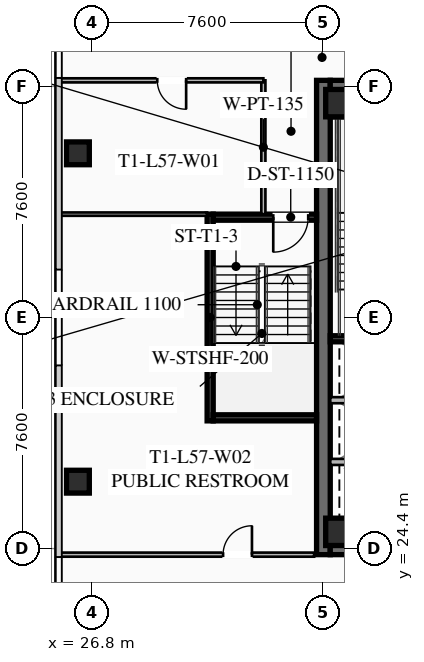
"""IFC4 building model, lengths in metres.
Left out: names, types, materials, properties, quantities, classifications, styles, units other than length and angle.
Written with IfcOpenShell. Run it as: python <this file> out.ifc"""

import sys

from ifc_helpers import new_model, si_unit, direction, frame, frame_2d, origin, origin_2d, place, context, subcontext, project, spatial, rectangle, hollow_rectangle, extrude, element, fill, save


model = new_model("IFC4")
c1 = context("Model", 3, precision=1e-05, world=origin(), true_north=direction((0.0, 1.0)))
c2 = subcontext(c1, "Body", "Model", "MODEL_VIEW")
j1 = project(units=[si_unit("LENGTHUNIT", "METRE"), si_unit("PLANEANGLEUNIT", "RADIAN")], contexts=[c1])
p1 = place(None, origin())
s1 = spatial("IfcSite", under=j1, at=p1, CompositionType="ELEMENT")
p2 = place(p1, origin())
s2 = spatial("IfcBuilding", under=s1, at=p2, CompositionType="ELEMENT")
p3 = place(p2, frame((0.0, 0.0, 211.3)))
s3 = spatial("IfcBuildingStorey", under=s2, at=p3, CompositionType="ELEMENT", Elevation=211.3)
p4 = place(p3, frame((34.425, 24.2, 0.0), z_axis=(0.0, 0.0, 1.0), x_axis=(0.0, 1.0, 0.0)))
e1 = element("IfcWall", 1, at=p4, inside=s3, PredefinedType="SHEAR", context=c2, shape_type="SweptSolid", body=[
    extrude(rectangle(XDim=15.6, YDim=0.45, at=frame_2d((7.8, 0.0))), origin(), (0.0, 0.0, 1.0), 3.55),
])
p5 = place(p3, frame((49.35, 24.425, 0.0), z_axis=(0.0, 0.0, 1.0), x_axis=(-1.0, 0.0, 0.0)))
e2 = element("IfcWall", 2, at=p5, inside=s3, PredefinedType="SHEAR", context=c2, shape_type="SweptSolid", body=[
    extrude(rectangle(XDim=14.7, YDim=0.45, at=frame_2d((7.35, 0.0))), origin(), (0.0, 0.0, 1.0), 3.55),
])
p6 = place(p5, frame((9.05, 0.0, 0.0)))
e3 = element("IfcOpeningElement", 3, at=p6, cuts=e2, PredefinedType="OPENING", context=c2, shape_type="SweptSolid", body=[
    extrude(rectangle(XDim=1.25, YDim=2.25, at=frame_2d((0.625, 1.125))), frame((0.0, 0.235, 0.0), z_axis=(0.0, -1.0, 0.0), x_axis=(1.0, 0.0, 0.0)), (0.0, 0.0, 1.0), 0.47),
])
p7 = place(p5, frame((4.0, 0.0, 0.0)))
e4 = element("IfcOpeningElement", 4, at=p7, cuts=e2, PredefinedType="OPENING", context=c2, shape_type="SweptSolid", body=[
    extrude(rectangle(XDim=1.25, YDim=2.25, at=frame_2d((0.625, 1.125))), frame((0.0, 0.235, 0.0), z_axis=(0.0, -1.0, 0.0), x_axis=(1.0, 0.0, 0.0)), (0.0, 0.0, 1.0), 0.47),
])
p8 = place(p3, frame((34.65, 39.575, 0.0), z_axis=(0.0, 0.0, 1.0), x_axis=(1.0, 0.0, 0.0)))
e5 = element("IfcWall", 5, at=p8, inside=s3, PredefinedType="SHEAR", context=c2, shape_type="SweptSolid", body=[
    extrude(rectangle(XDim=14.7, YDim=0.45, at=frame_2d((7.35, 0.0))), origin(), (0.0, 0.0, 1.0), 3.55),
])
p9 = place(p8, frame((4.4, 0.0, 0.0)))
e6 = element("IfcOpeningElement", 6, at=p9, cuts=e5, PredefinedType="OPENING", context=c2, shape_type="SweptSolid", body=[
    extrude(rectangle(XDim=1.25, YDim=2.25, at=frame_2d((0.625, 1.125))), frame((0.0, 0.235, 0.0), z_axis=(0.0, -1.0, 0.0), x_axis=(1.0, 0.0, 0.0)), (0.0, 0.0, 1.0), 0.47),
])
p10 = place(p8, frame((9.45, 0.0, 0.0)))
e7 = element("IfcOpeningElement", 7, at=p10, cuts=e5, PredefinedType="OPENING", context=c2, shape_type="SweptSolid", body=[
    extrude(rectangle(XDim=1.25, YDim=2.25, at=frame_2d((0.625, 1.125))), frame((0.0, 0.235, 0.0), z_axis=(0.0, -1.0, 0.0), x_axis=(1.0, 0.0, 0.0)), (0.0, 0.0, 1.0), 0.47),
])
for number, where, z_axis, x_axis in (
    (8, (34.95, 24.95, 0.0), (0.0, 0.0, 1.0), (1.0, 0.0, 0.0)),
    (9, (34.95, 39.05, 0.0), (0.0, 0.0, 1.0), (1.0, 0.0, 0.0)),
):
    element("IfcColumn", number, at=place(p3, frame(where, z_axis=z_axis, x_axis=x_axis)), inside=s3, PredefinedType="COLUMN", context=c2, shape_type="SweptSolid", body=[
        extrude(hollow_rectangle(XDim=0.9, YDim=0.9, WallThickness=0.04, at=origin_2d()), origin(), (0.0, 0.0, 1.0), 3.37),
    ])
for number, where, z_axis, x_axis in (
    (10, (26.35, 37.4, 0.0), (0.0, 0.0, 1.0), (1.0, 0.0, 0.0)),
    (11, (26.35, 26.6, 0.0), (0.0, 0.0, 1.0), (1.0, 0.0, 0.0)),
):
    element("IfcColumn", number, at=place(p3, frame(where, z_axis=z_axis, x_axis=x_axis)), inside=s3, PredefinedType="COLUMN", context=c2, shape_type="SweptSolid", body=[
        extrude(hollow_rectangle(XDim=0.75, YDim=0.75, WallThickness=0.032, at=origin_2d()), origin(), (0.0, 0.0, 1.0), 3.37),
    ])
for number, where, z_axis, x_axis in (
    (12, (34.65, 31.3, 0.0), (0.0, 0.0, 1.0), (1.0, 0.0, 0.0)),
    (13, (34.65, 38.7, 0.0), (0.0, 0.0, 1.0), (1.0, 0.0, 0.0)),
):
    element("IfcWall", number, at=place(p3, frame(where, z_axis=z_axis, x_axis=x_axis)), inside=s3, PredefinedType="SHEAR", context=c2, shape_type="SweptSolid", body=[
        extrude(rectangle(XDim=3.65, YDim=0.2, at=frame_2d((1.825, 0.0))), origin(), (0.0, 0.0, 1.0), 3.37),
    ])
for number, where, z_axis, x_axis in (
    (14, (34.65, 27.25, 0.0), (0.0, 0.0, 1.0), (1.0, 0.0, 0.0)),
    (15, (34.65, 29.28, 0.0), (0.0, 0.0, 1.0), (1.0, 0.0, 0.0)),
):
    element("IfcWall", number, at=place(p3, frame(where, z_axis=z_axis, x_axis=x_axis)), inside=s3, PredefinedType="SOLIDWALL", context=c2, shape_type="SweptSolid", body=[
        extrude(rectangle(XDim=3.3, YDim=0.2, at=frame_2d((1.65, 0.0))), origin(), (0.0, 0.0, 1.0), 3.37),
    ])
p11 = place(p3, frame((30.7, 28.6, 0.0), z_axis=(0.0, 0.0, 1.0), x_axis=(0.0, 1.0, 0.0)))
e16 = element("IfcWall", 16, at=p11, inside=s3, PredefinedType="SHEAR", context=c2, shape_type="SweptSolid", body=[
    extrude(rectangle(XDim=6.8, YDim=0.2, at=frame_2d((3.4, 0.0))), origin(), (0.0, 0.0, 1.0), 3.37),
])
p12 = place(p3, frame((34.2, 35.3, 0.0), z_axis=(0.0, 0.0, 1.0), x_axis=(-1.0, 0.0, 0.0)))
e17 = element("IfcWall", 17, at=p12, inside=s3, PredefinedType="SHEAR", context=c2, shape_type="SweptSolid", body=[
    extrude(rectangle(XDim=3.4, YDim=0.2, at=frame_2d((1.7, 0.0))), origin(), (0.0, 0.0, 1.0), 3.37),
])
p13 = place(p12, frame((0.275, 0.0, 0.0)))
e18 = element("IfcOpeningElement", 18, at=p13, cuts=e17, PredefinedType="OPENING", context=c2, shape_type="SweptSolid", body=[
    extrude(rectangle(XDim=1.15, YDim=2.2, at=frame_2d((0.575, 1.1))), frame((0.0, 0.11, 0.0), z_axis=(0.0, -1.0, 0.0), x_axis=(1.0, 0.0, 0.0)), (0.0, 0.0, 1.0), 0.22),
])
p14 = place(p3, frame((30.8, 28.7, 0.0), z_axis=(0.0, 0.0, 1.0), x_axis=(1.0, 0.0, 0.0)))
e19 = element("IfcWall", 19, at=p14, inside=s3, PredefinedType="SHEAR", context=c2, shape_type="SweptSolid", body=[
    extrude(rectangle(XDim=3.4, YDim=0.2, at=frame_2d((1.7, 0.0))), origin(), (0.0, 0.0, 1.0), 3.37),
])
p15 = place(p3, frame((32.45, 35.4, 0.0), z_axis=(0.0, 0.0, 1.0), x_axis=(0.0, 1.0, 0.0)))
e20 = element("IfcWall", 20, at=p15, inside=s3, PredefinedType="PARTITIONING", context=c2, shape_type="SweptSolid", body=[
    extrude(rectangle(XDim=4.4, YDim=0.135, at=frame_2d((2.2, 0.0))), origin(), (0.0, 0.0, 1.0), 2.723),
])
p16 = place(p3, frame((32.45, 39.8, 0.0), z_axis=(0.0, 0.0, 1.0), x_axis=(-1.0, 0.0, 0.0)))
e21 = element("IfcWall", 21, at=p16, inside=s3, PredefinedType="PARTITIONING", context=c2, shape_type="SweptSolid", body=[
    extrude(rectangle(XDim=6.73, YDim=0.135, at=frame_2d((3.365, 0.0))), origin(), (0.0, 0.0, 1.0), 2.723),
])
p17 = place(p16, frame((2.54, 0.0, 0.0)))
e22 = element("IfcOpeningElement", 22, at=p17, cuts=e21, PredefinedType="OPENING", context=c2, shape_type="SweptSolid", body=[
    extrude(rectangle(XDim=0.95, YDim=2.05, at=frame_2d((0.475, 1.025))), frame((0.0, 0.077, 0.0), z_axis=(0.0, -1.0, 0.0), x_axis=(1.0, 0.0, 0.0)), (0.0, 0.0, 1.0), 0.155),
])
p18 = place(p3, frame((25.72, 24.2, 0.0), z_axis=(0.0, 0.0, 1.0), x_axis=(1.0, 0.0, 0.0)))
e23 = element("IfcWall", 23, at=p18, inside=s3, PredefinedType="PARTITIONING", context=c2, shape_type="SweptSolid", body=[
    extrude(rectangle(XDim=8.4, YDim=0.135, at=frame_2d((4.2, 0.0))), origin(), (0.0, 0.0, 1.0), 2.723),
])
p19 = place(p18, frame((5.405, 0.0, 0.0)))
e24 = element("IfcOpeningElement", 24, at=p19, cuts=e23, PredefinedType="OPENING", context=c2, shape_type="SweptSolid", body=[
    extrude(rectangle(XDim=0.95, YDim=2.05, at=frame_2d((0.475, 1.025))), frame((0.0, 0.077, 0.0), z_axis=(0.0, -1.0, 0.0), x_axis=(1.0, 0.0, 0.0)), (0.0, 0.0, 1.0), 0.155),
])
p20 = place(p3, frame((30.6, 35.4, 0.0), z_axis=(0.0, 0.0, 1.0), x_axis=(-1.0, 0.0, 0.0)))
e25 = element("IfcWall", 25, at=p20, inside=s3, PredefinedType="PARTITIONING", context=c2, shape_type="SweptSolid", body=[
    extrude(rectangle(XDim=4.88, YDim=0.11, at=frame_2d((2.44, 0.0))), origin(), (0.0, 0.0, 1.0), 2.723),
])
p21 = place(p13, origin())
e26 = element("IfcDoor", 26, at=p21, inside=s3, OperationType="SINGLE_SWING_RIGHT", PredefinedType="DOOR", context=c2, shape_type="SweptSolid", body=[
    extrude(rectangle(XDim=1.15, YDim=2.2, at=frame_2d((0.575, 1.1))), frame((0.0, 0.025, 0.0), z_axis=(0.0, -1.0, 0.0), x_axis=(1.0, 0.0, 0.0)), (0.0, 0.0, 1.0), 0.05),
])
fill(e18, e26)
p22 = place(p17, origin())
e27 = element("IfcDoor", 27, at=p22, inside=s3, OperationType="SINGLE_SWING_LEFT", PredefinedType="DOOR", context=c2, shape_type="SweptSolid", body=[
    extrude(rectangle(XDim=0.95, YDim=2.05, at=frame_2d((0.475, 1.025))), frame((0.0, 0.025, 0.0), z_axis=(0.0, -1.0, 0.0), x_axis=(1.0, 0.0, 0.0)), (0.0, 0.0, 1.0), 0.05),
])
fill(e22, e27)
p23 = place(p19, origin())
e28 = element("IfcDoor", 28, at=p23, inside=s3, OperationType="SINGLE_SWING_RIGHT", PredefinedType="DOOR", context=c2, shape_type="SweptSolid", body=[
    extrude(rectangle(XDim=0.95, YDim=2.05, at=frame_2d((0.475, 1.025))), frame((0.0, 0.025, 0.0), z_axis=(0.0, -1.0, 0.0), x_axis=(1.0, 0.0, 0.0)), (0.0, 0.0, 1.0), 0.05),
])
fill(e24, e28)
save(model, sys.argv[1])
